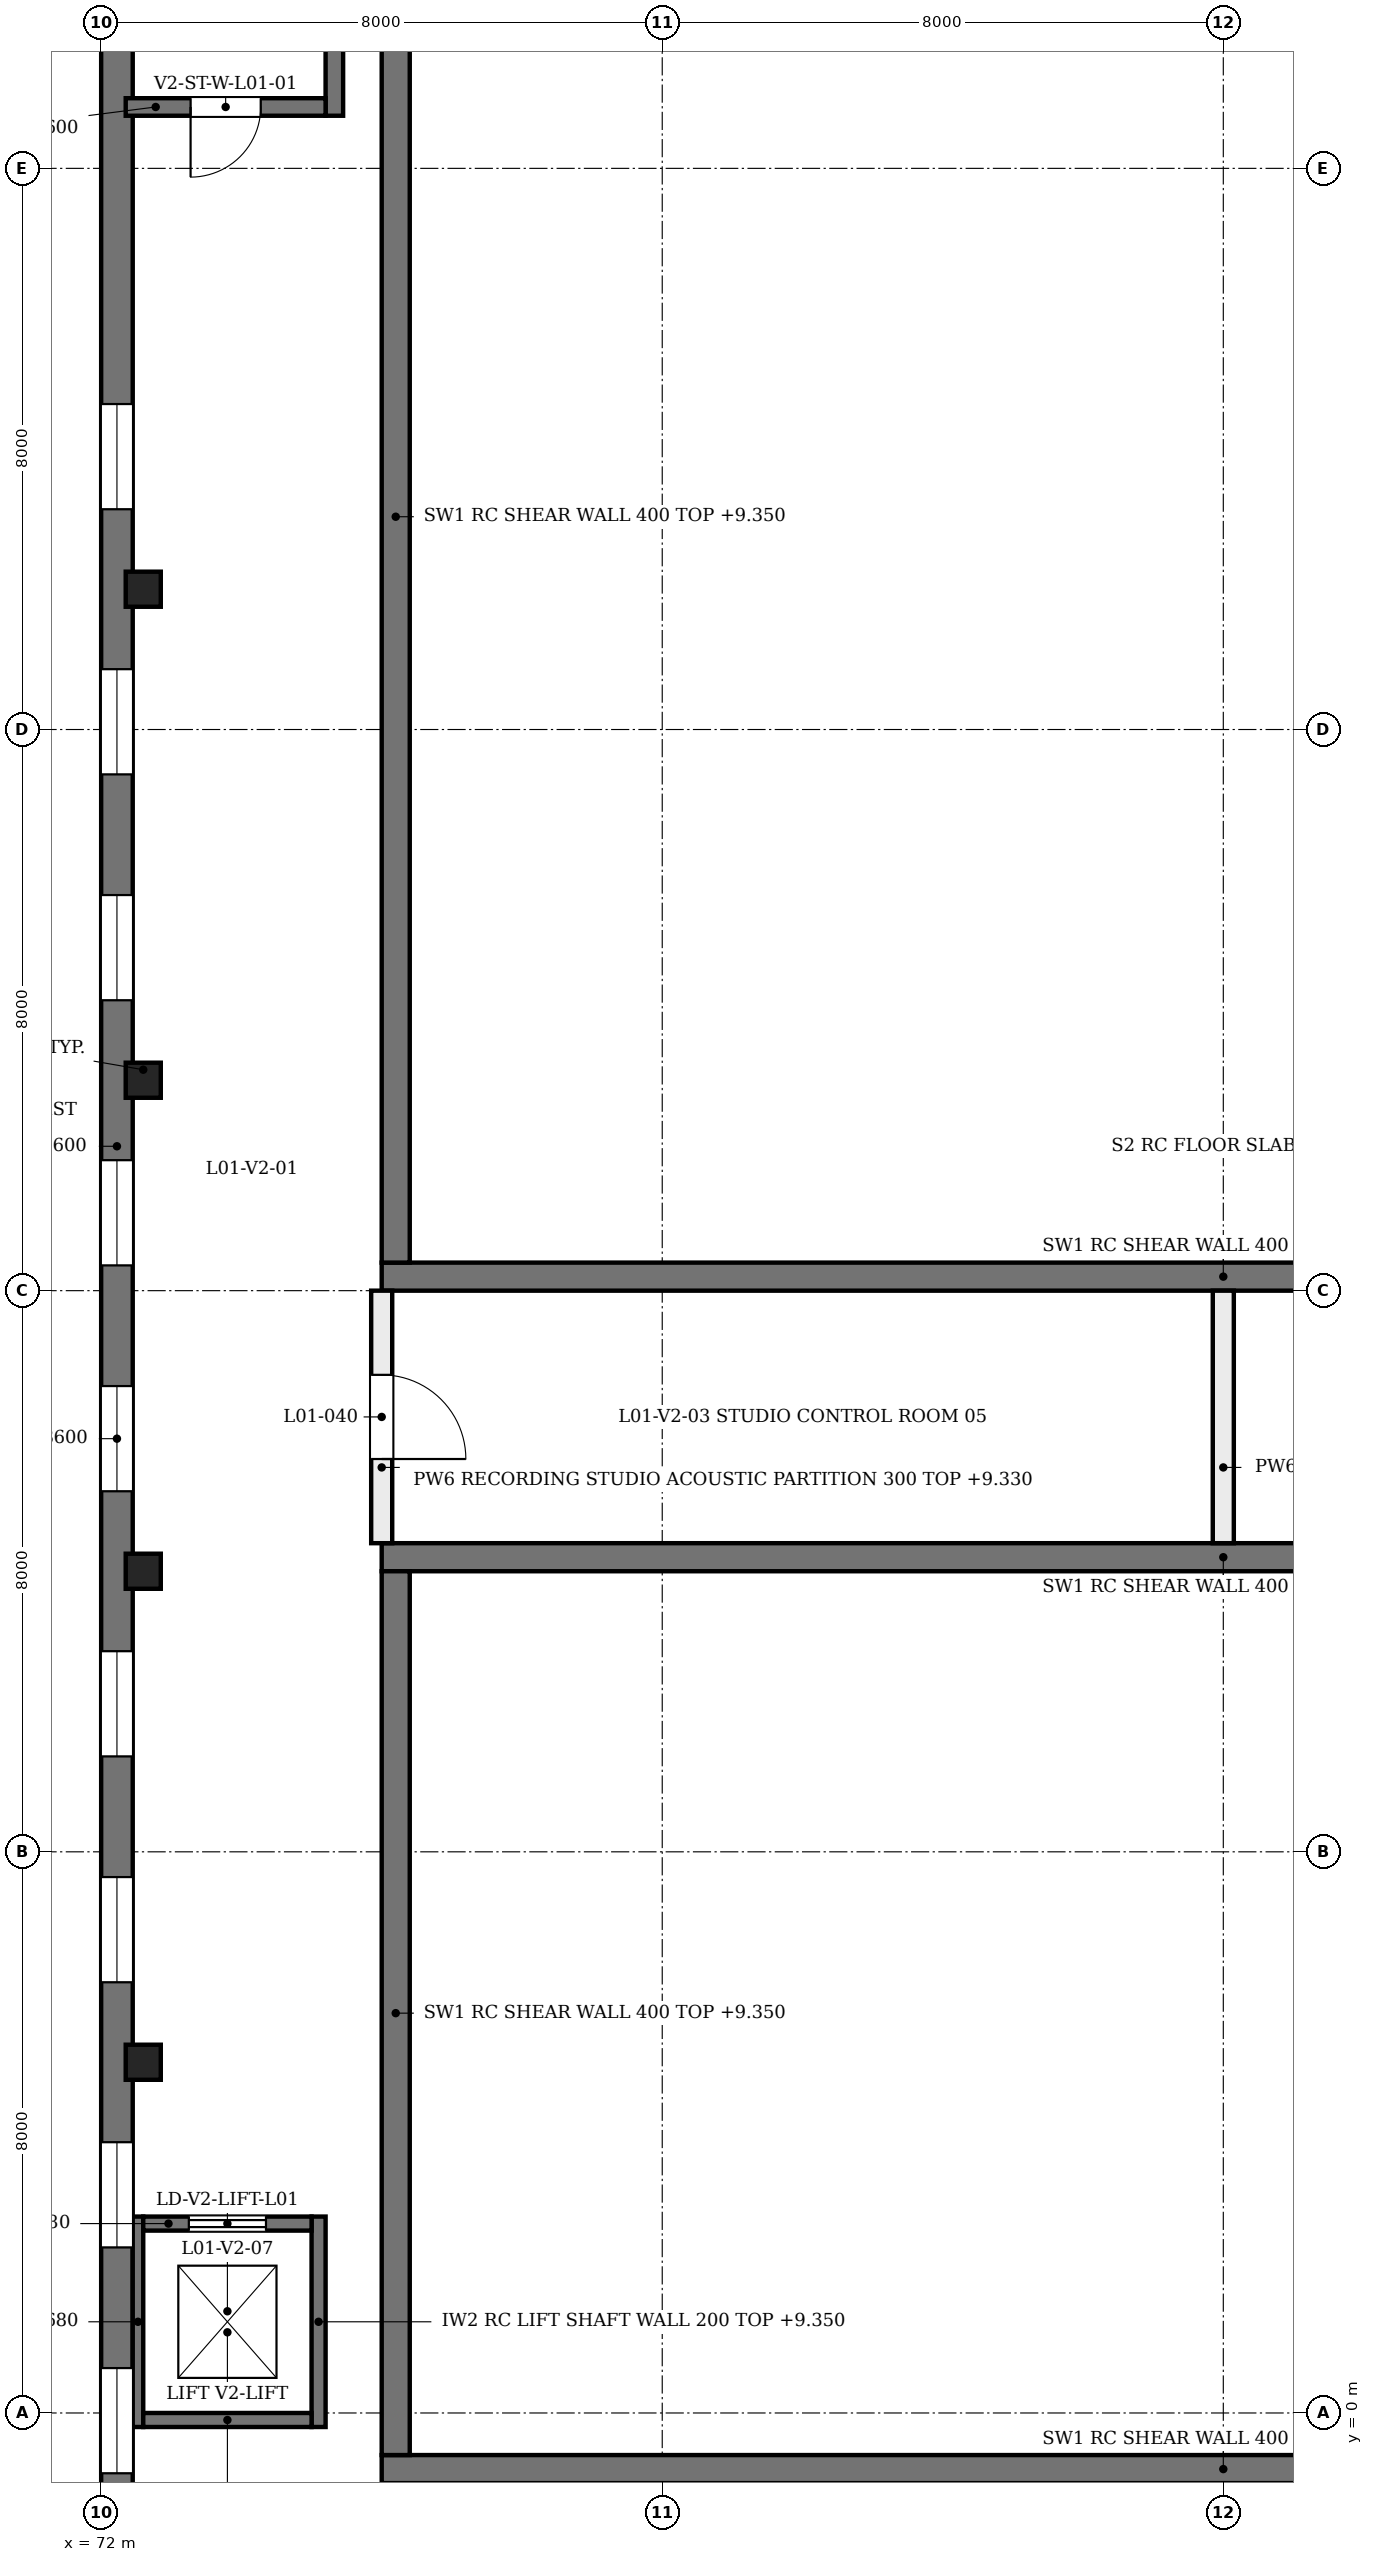
"""IFC4 building model, lengths in metres.
Left out: names, types, materials, properties, quantities, classifications, styles, units other than length and angle.
Written with IfcOpenShell. Run it as: python <this file> out.ifc"""

import sys

from ifc_helpers import new_model, si_unit, direction, frame, frame_2d, origin, origin_2d, place, context, subcontext, project, spatial, rectangle, hollow_rectangle, extrude, element, fill, save


model = new_model("IFC4")
c1 = context("Model", 3, precision=1e-05, world=origin(), true_north=direction((0.0, 1.0)))
c2 = subcontext(c1, "Body", "Model", "MODEL_VIEW")
j1 = project(units=[si_unit("LENGTHUNIT", "METRE"), si_unit("PLANEANGLEUNIT", "RADIAN")], contexts=[c1])
p1 = place(None, origin())
s1 = spatial("IfcSite", under=j1, at=p1, CompositionType="ELEMENT")
p2 = place(p1, origin())
s2 = spatial("IfcBuilding", under=s1, at=p2, CompositionType="ELEMENT")
p3 = place(p2, frame((0.0, 0.0, 4.8)))
s3 = spatial("IfcBuildingStorey", under=s2, at=p3, CompositionType="ELEMENT", Elevation=4.8)
p4 = place(p3, frame((76.0, 16.2, 0.0), z_axis=(0.0, 0.0, 1.0), x_axis=(1.0, 0.0, 0.0)))
e1 = element("IfcWall", 1, at=p4, inside=s3, PredefinedType="SHEAR", context=c2, shape_type="SweptSolid", body=[
    extrude(rectangle(XDim=24.0, YDim=0.4, at=frame_2d((12.0, 0.0))), origin(), (0.0, 0.0, 1.0), 4.55),
])
p5 = place(p3, frame((76.2, 16.4, 0.0), z_axis=(0.0, 0.0, 1.0), x_axis=(0.0, 1.0, 0.0)))
e2 = element("IfcWall", 2, at=p5, inside=s3, PredefinedType="SHEAR", context=c2, shape_type="SweptSolid", body=[
    extrude(rectangle(XDim=22.6, YDim=0.4, at=frame_2d((11.3, 0.0))), origin(), (0.0, 0.0, 1.0), 4.55),
])
for number, where, z_axis, x_axis in (
    (3, (76.0, -0.8, 0.0), (0.0, 0.0, 1.0), (1.0, 0.0, 0.0)),
    (4, (76.0, 12.2, 0.0), (0.0, 0.0, 1.0), (1.0, 0.0, 0.0)),
):
    element("IfcWall", number, at=place(p3, frame(where, z_axis=z_axis, x_axis=x_axis)), inside=s3, PredefinedType="SHEAR", context=c2, shape_type="SweptSolid", body=[
        extrude(rectangle(XDim=24.0, YDim=0.4, at=frame_2d((12.0, 0.0))), origin(), (0.0, 0.0, 1.0), 4.55),
    ])
p6 = place(p3, frame((76.2, -0.6, 0.0), z_axis=(0.0, 0.0, 1.0), x_axis=(0.0, 1.0, 0.0)))
e5 = element("IfcWall", 5, at=p6, inside=s3, PredefinedType="SHEAR", context=c2, shape_type="SweptSolid", body=[
    extrude(rectangle(XDim=12.6, YDim=0.4, at=frame_2d((6.3, 0.0))), origin(), (0.0, 0.0, 1.0), 4.55),
])
for number, where, z_axis, x_axis in (
    (6, (72.6, 5.0, 0.0), (0.0, 0.0, 1.0), (1.0, 0.0, 0.0)),
    (7, (72.6, 12.0, 0.0), (0.0, 0.0, 1.0), (1.0, 0.0, 0.0)),
    (8, (72.6, 19.0, 0.0), (0.0, 0.0, 1.0), (1.0, 0.0, 0.0)),
    (9, (72.6, 26.0, 0.0), (0.0, 0.0, 1.0), (1.0, 0.0, 0.0)),
):
    element("IfcColumn", number, at=place(p3, frame(where, z_axis=z_axis, x_axis=x_axis)), inside=s3, PredefinedType="COLUMN", context=c2, shape_type="SweptSolid", body=[
        extrude(rectangle(XDim=0.5, YDim=0.5, at=origin_2d()), origin(), (0.0, 0.0, 1.0), 4.8),
    ])
for number, where, z_axis, x_axis in (
    (10, (70.787, 5.0, 0.0), (0.101, 0.0, 0.995), (0.0, 1.0, 0.0)),
    (11, (70.787, 12.0, 0.0), (0.101, 0.0, 0.995), (0.0, 1.0, 0.0)),
    (12, (70.787, 19.0, 0.0), (0.101, 0.0, 0.995), (0.0, 1.0, 0.0)),
    (13, (70.787, 26.0, 0.0), (0.101, 0.0, 0.995), (0.0, 1.0, 0.0)),
    (14, (70.787, 33.0, 0.0), (0.101, 0.0, 0.995), (0.0, 1.0, 0.0)),
):
    element("IfcColumn", number, at=place(p3, frame(where, z_axis=z_axis, x_axis=x_axis)), inside=s3, PredefinedType="COLUMN", context=c2, shape_type="SweptSolid", body=[
        extrude(hollow_rectangle(XDim=0.4, YDim=0.4, WallThickness=0.012, InnerFilletRadius=0.012, OuterFilletRadius=0.019, at=origin_2d()), origin(), (0.0, 0.0, 1.0), 4.825),
    ])
p7 = place(p3, frame((72.225, -1.55, 0.0), z_axis=(0.0, 0.0, 1.0), x_axis=(0.0, 1.0, 0.0)))
e15 = element("IfcWall", 15, at=p7, inside=s3, PredefinedType="SOLIDWALL", context=c2, shape_type="SweptSolid", body=[
    extrude(rectangle(XDim=41.1, YDim=0.45, at=frame_2d((20.55, 0.0))), origin(), (0.0, 0.0, 1.0), 4.8),
])
p8 = place(p7, frame((0.69, 0.0, 0.6)))
e16 = element("IfcOpeningElement", 16, at=p8, cuts=e15, PredefinedType="OPENING", context=c2, shape_type="SweptSolid", body=[
    extrude(rectangle(XDim=1.5, YDim=3.6, at=frame_2d((0.75, 1.8))), frame((0.0, 0.235, 0.0), z_axis=(0.0, -1.0, 0.0), x_axis=(1.0, 0.0, 0.0)), (0.0, 0.0, 1.0), 0.47),
])
p9 = place(p7, frame((3.91, 0.0, 0.6)))
e17 = element("IfcOpeningElement", 17, at=p9, cuts=e15, PredefinedType="OPENING", context=c2, shape_type="SweptSolid", body=[
    extrude(rectangle(XDim=1.5, YDim=3.6, at=frame_2d((0.75, 1.8))), frame((0.0, 0.235, 0.0), z_axis=(0.0, -1.0, 0.0), x_axis=(1.0, 0.0, 0.0)), (0.0, 0.0, 1.0), 0.47),
])
p10 = place(p7, frame((7.69, 0.0, 0.6)))
e18 = element("IfcOpeningElement", 18, at=p10, cuts=e15, PredefinedType="OPENING", context=c2, shape_type="SweptSolid", body=[
    extrude(rectangle(XDim=1.5, YDim=3.6, at=frame_2d((0.75, 1.8))), frame((0.0, 0.235, 0.0), z_axis=(0.0, -1.0, 0.0), x_axis=(1.0, 0.0, 0.0)), (0.0, 0.0, 1.0), 0.47),
])
p11 = place(p7, frame((10.91, 0.0, 0.6)))
e19 = element("IfcOpeningElement", 19, at=p11, cuts=e15, PredefinedType="OPENING", context=c2, shape_type="SweptSolid", body=[
    extrude(rectangle(XDim=1.5, YDim=3.6, at=frame_2d((0.75, 1.8))), frame((0.0, 0.235, 0.0), z_axis=(0.0, -1.0, 0.0), x_axis=(1.0, 0.0, 0.0)), (0.0, 0.0, 1.0), 0.47),
])
p12 = place(p7, frame((14.69, 0.0, 0.6)))
e20 = element("IfcOpeningElement", 20, at=p12, cuts=e15, PredefinedType="OPENING", context=c2, shape_type="SweptSolid", body=[
    extrude(rectangle(XDim=1.5, YDim=3.6, at=frame_2d((0.75, 1.8))), frame((0.0, 0.235, 0.0), z_axis=(0.0, -1.0, 0.0), x_axis=(1.0, 0.0, 0.0)), (0.0, 0.0, 1.0), 0.47),
])
p13 = place(p7, frame((17.91, 0.0, 0.6)))
e21 = element("IfcOpeningElement", 21, at=p13, cuts=e15, PredefinedType="OPENING", context=c2, shape_type="SweptSolid", body=[
    extrude(rectangle(XDim=1.5, YDim=3.6, at=frame_2d((0.75, 1.8))), frame((0.0, 0.235, 0.0), z_axis=(0.0, -1.0, 0.0), x_axis=(1.0, 0.0, 0.0)), (0.0, 0.0, 1.0), 0.47),
])
p14 = place(p7, frame((21.69, 0.0, 0.6)))
e22 = element("IfcOpeningElement", 22, at=p14, cuts=e15, PredefinedType="OPENING", context=c2, shape_type="SweptSolid", body=[
    extrude(rectangle(XDim=1.5, YDim=3.6, at=frame_2d((0.75, 1.8))), frame((0.0, 0.235, 0.0), z_axis=(0.0, -1.0, 0.0), x_axis=(1.0, 0.0, 0.0)), (0.0, 0.0, 1.0), 0.47),
])
p15 = place(p7, frame((24.91, 0.0, 0.6)))
e23 = element("IfcOpeningElement", 23, at=p15, cuts=e15, PredefinedType="OPENING", context=c2, shape_type="SweptSolid", body=[
    extrude(rectangle(XDim=1.5, YDim=3.6, at=frame_2d((0.75, 1.8))), frame((0.0, 0.235, 0.0), z_axis=(0.0, -1.0, 0.0), x_axis=(1.0, 0.0, 0.0)), (0.0, 0.0, 1.0), 0.47),
])
p16 = place(p7, frame((28.69, 0.0, 0.6)))
e24 = element("IfcOpeningElement", 24, at=p16, cuts=e15, PredefinedType="OPENING", context=c2, shape_type="SweptSolid", body=[
    extrude(rectangle(XDim=1.5, YDim=3.6, at=frame_2d((0.75, 1.8))), frame((0.0, 0.235, 0.0), z_axis=(0.0, -1.0, 0.0), x_axis=(1.0, 0.0, 0.0)), (0.0, 0.0, 1.0), 0.47),
])
p17 = place(p3, frame((75.325, 32.75, 0.0), z_axis=(0.0, 0.0, 1.0), x_axis=(0.0, 1.0, 0.0)))
e25 = element("IfcWall", 25, at=p17, inside=s3, PredefinedType="SOLIDWALL", context=c2, shape_type="SweptSolid", body=[
    extrude(rectangle(XDim=6.8, YDim=0.25, at=frame_2d((3.4, 0.0))), origin(), (0.0, 0.0, 1.0), 4.8),
])
p18 = place(p3, frame((72.35, 32.875, 0.0), z_axis=(0.0, 0.0, 1.0), x_axis=(1.0, 0.0, 0.0)))
e26 = element("IfcWall", 26, at=p18, inside=s3, PredefinedType="SOLIDWALL", context=c2, shape_type="SweptSolid", body=[
    extrude(rectangle(XDim=2.85, YDim=0.25, at=frame_2d((1.425, 0.0))), origin(), (0.0, 0.0, 1.0), 4.8),
])
p19 = place(p18, frame((0.925, 0.0, 0.0)))
e27 = element("IfcOpeningElement", 27, at=p19, cuts=e26, PredefinedType="OPENING", context=c2, shape_type="SweptSolid", body=[
    extrude(rectangle(XDim=1.0, YDim=2.1, at=frame_2d((0.5, 1.05))), frame((0.0, 0.135, 0.0), z_axis=(0.0, -1.0, 0.0), x_axis=(1.0, 0.0, 0.0)), (0.0, 0.0, 1.0), 0.27),
])
p20 = place(p3, frame((72.525, -0.2, 0.0), z_axis=(0.0, 0.0, 1.0), x_axis=(0.0, 1.0, 0.0)))
e28 = element("IfcWall", 28, at=p20, inside=s3, PredefinedType="SOLIDWALL", context=c2, shape_type="SweptSolid", body=[
    extrude(rectangle(XDim=3.0, YDim=0.15, at=frame_2d((1.5, 0.0))), origin(), (0.0, 0.0, 1.0), 3.88),
])
p21 = place(p3, frame((75.1, -0.2, 0.0), z_axis=(0.0, 0.0, 1.0), x_axis=(0.0, 1.0, 0.0)))
e29 = element("IfcWall", 29, at=p21, inside=s3, PredefinedType="SOLIDWALL", context=c2, shape_type="SweptSolid", body=[
    extrude(rectangle(XDim=3.0, YDim=0.2, at=frame_2d((1.5, 0.0))), origin(), (0.0, 0.0, 1.0), 4.55),
])
p22 = place(p3, frame((72.6, -0.1, 0.0), z_axis=(0.0, 0.0, 1.0), x_axis=(1.0, 0.0, 0.0)))
e30 = element("IfcWall", 30, at=p22, inside=s3, PredefinedType="SOLIDWALL", context=c2, shape_type="SweptSolid", body=[
    extrude(rectangle(XDim=2.4, YDim=0.2, at=frame_2d((1.2, 0.0))), origin(), (0.0, 0.0, 1.0), 3.88),
])
p23 = place(p3, frame((72.6, 2.7, 0.0), z_axis=(0.0, 0.0, 1.0), x_axis=(1.0, 0.0, 0.0)))
e31 = element("IfcWall", 31, at=p23, inside=s3, PredefinedType="SOLIDWALL", context=c2, shape_type="SweptSolid", body=[
    extrude(rectangle(XDim=2.4, YDim=0.2, at=frame_2d((1.2, 0.0))), origin(), (0.0, 0.0, 1.0), 3.88),
])
p24 = place(p23, frame((0.65, 0.0, 0.0)))
e32 = element("IfcOpeningElement", 32, at=p24, cuts=e31, PredefinedType="OPENING", context=c2, shape_type="SweptSolid", body=[
    extrude(rectangle(XDim=1.1, YDim=2.1, at=frame_2d((0.55, 1.05))), frame((0.0, 0.11, 0.0), z_axis=(0.0, -1.0, 0.0), x_axis=(1.0, 0.0, 0.0)), (0.0, 0.0, 1.0), 0.22),
])
p25 = place(p3, frame((76.0, 12.4, 0.0), z_axis=(0.0, 0.0, 1.0), x_axis=(0.0, 1.0, 0.0)))
e33 = element("IfcWall", 33, at=p25, inside=s3, PredefinedType="PARTITIONING", context=c2, shape_type="SweptSolid", body=[
    extrude(rectangle(XDim=3.6, YDim=0.3, at=frame_2d((1.8, 0.0))), origin(), (0.0, 0.0, 1.0), 4.53),
])
p26 = place(p25, frame((1.2, 0.0, 0.0)))
e34 = element("IfcOpeningElement", 34, at=p26, cuts=e33, PredefinedType="OPENING", context=c2, shape_type="SweptSolid", body=[
    extrude(rectangle(XDim=1.2, YDim=2.2, at=frame_2d((0.6, 1.1))), frame((0.0, 0.16, 0.0), z_axis=(0.0, -1.0, 0.0), x_axis=(1.0, 0.0, 0.0)), (0.0, 0.0, 1.0), 0.32),
])
p27 = place(p3, frame((88.0, 12.4, 0.0), z_axis=(0.0, 0.0, 1.0), x_axis=(0.0, 1.0, 0.0)))
e35 = element("IfcWall", 35, at=p27, inside=s3, PredefinedType="PARTITIONING", context=c2, shape_type="SweptSolid", body=[
    extrude(rectangle(XDim=3.6, YDim=0.3, at=frame_2d((1.8, 0.0))), origin(), (0.0, 0.0, 1.0), 3.88),
])
p28 = place(p8, origin())
e36 = element("IfcWindow", 36, at=p28, inside=s3, PartitioningType="SINGLE_PANEL", PredefinedType="WINDOW", context=c2, shape_type="SweptSolid", body=[
    extrude(rectangle(XDim=1.5, YDim=3.6, at=frame_2d((0.75, 1.8))), frame((0.0, 0.03, 0.0), z_axis=(0.0, -1.0, 0.0), x_axis=(1.0, 0.0, 0.0)), (0.0, 0.0, 1.0), 0.06),
])
fill(e16, e36)
p29 = place(p9, origin())
e37 = element("IfcWindow", 37, at=p29, inside=s3, PartitioningType="SINGLE_PANEL", PredefinedType="WINDOW", context=c2, shape_type="SweptSolid", body=[
    extrude(rectangle(XDim=1.5, YDim=3.6, at=frame_2d((0.75, 1.8))), frame((0.0, 0.03, 0.0), z_axis=(0.0, -1.0, 0.0), x_axis=(1.0, 0.0, 0.0)), (0.0, 0.0, 1.0), 0.06),
])
fill(e17, e37)
p30 = place(p10, origin())
e38 = element("IfcWindow", 38, at=p30, inside=s3, PartitioningType="SINGLE_PANEL", PredefinedType="WINDOW", context=c2, shape_type="SweptSolid", body=[
    extrude(rectangle(XDim=1.5, YDim=3.6, at=frame_2d((0.75, 1.8))), frame((0.0, 0.03, 0.0), z_axis=(0.0, -1.0, 0.0), x_axis=(1.0, 0.0, 0.0)), (0.0, 0.0, 1.0), 0.06),
])
fill(e18, e38)
p31 = place(p11, origin())
e39 = element("IfcWindow", 39, at=p31, inside=s3, PartitioningType="SINGLE_PANEL", PredefinedType="WINDOW", context=c2, shape_type="SweptSolid", body=[
    extrude(rectangle(XDim=1.5, YDim=3.6, at=frame_2d((0.75, 1.8))), frame((0.0, 0.03, 0.0), z_axis=(0.0, -1.0, 0.0), x_axis=(1.0, 0.0, 0.0)), (0.0, 0.0, 1.0), 0.06),
])
fill(e19, e39)
p32 = place(p12, origin())
e40 = element("IfcWindow", 40, at=p32, inside=s3, PartitioningType="SINGLE_PANEL", PredefinedType="WINDOW", context=c2, shape_type="SweptSolid", body=[
    extrude(rectangle(XDim=1.5, YDim=3.6, at=frame_2d((0.75, 1.8))), frame((0.0, 0.03, 0.0), z_axis=(0.0, -1.0, 0.0), x_axis=(1.0, 0.0, 0.0)), (0.0, 0.0, 1.0), 0.06),
])
fill(e20, e40)
p33 = place(p13, origin())
e41 = element("IfcWindow", 41, at=p33, inside=s3, PartitioningType="SINGLE_PANEL", PredefinedType="WINDOW", context=c2, shape_type="SweptSolid", body=[
    extrude(rectangle(XDim=1.5, YDim=3.6, at=frame_2d((0.75, 1.8))), frame((0.0, 0.03, 0.0), z_axis=(0.0, -1.0, 0.0), x_axis=(1.0, 0.0, 0.0)), (0.0, 0.0, 1.0), 0.06),
])
fill(e21, e41)
p34 = place(p14, origin())
e42 = element("IfcWindow", 42, at=p34, inside=s3, PartitioningType="SINGLE_PANEL", PredefinedType="WINDOW", context=c2, shape_type="SweptSolid", body=[
    extrude(rectangle(XDim=1.5, YDim=3.6, at=frame_2d((0.75, 1.8))), frame((0.0, 0.03, 0.0), z_axis=(0.0, -1.0, 0.0), x_axis=(1.0, 0.0, 0.0)), (0.0, 0.0, 1.0), 0.06),
])
fill(e22, e42)
p35 = place(p15, origin())
e43 = element("IfcWindow", 43, at=p35, inside=s3, PartitioningType="SINGLE_PANEL", PredefinedType="WINDOW", context=c2, shape_type="SweptSolid", body=[
    extrude(rectangle(XDim=1.5, YDim=3.6, at=frame_2d((0.75, 1.8))), frame((0.0, 0.03, 0.0), z_axis=(0.0, -1.0, 0.0), x_axis=(1.0, 0.0, 0.0)), (0.0, 0.0, 1.0), 0.06),
])
fill(e23, e43)
p36 = place(p16, origin())
e44 = element("IfcWindow", 44, at=p36, inside=s3, PartitioningType="SINGLE_PANEL", PredefinedType="WINDOW", context=c2, shape_type="SweptSolid", body=[
    extrude(rectangle(XDim=1.5, YDim=3.6, at=frame_2d((0.75, 1.8))), frame((0.0, 0.03, 0.0), z_axis=(0.0, -1.0, 0.0), x_axis=(1.0, 0.0, 0.0)), (0.0, 0.0, 1.0), 0.06),
])
fill(e24, e44)
p37 = place(p19, frame((1.0, 0.0, 0.0), z_axis=(0.0, 0.0, 1.0), x_axis=(-1.0, 0.0, 0.0)))
e45 = element("IfcDoor", 45, at=p37, inside=s3, OperationType="SINGLE_SWING_LEFT", PredefinedType="DOOR", context=c2, shape_type="SweptSolid", body=[
    extrude(rectangle(XDim=1.0, YDim=2.1, at=frame_2d((0.5, 1.05))), frame((0.0, 0.025, 0.0), z_axis=(0.0, -1.0, 0.0), x_axis=(1.0, 0.0, 0.0)), (0.0, 0.0, 1.0), 0.05),
])
fill(e27, e45)
p38 = place(p24, origin())
e46 = element("IfcDoor", 46, at=p38, inside=s3, OperationType="DOUBLE_DOOR_SLIDING", PredefinedType="DOOR", context=c2, shape_type="SweptSolid", body=[
    extrude(rectangle(XDim=1.1, YDim=2.1, at=frame_2d((0.55, 1.05))), frame((0.0, 0.025, 0.0), z_axis=(0.0, -1.0, 0.0), x_axis=(1.0, 0.0, 0.0)), (0.0, 0.0, 1.0), 0.05),
])
fill(e32, e46)
p39 = place(p26, frame((1.2, 0.0, 0.0), z_axis=(0.0, 0.0, 1.0), x_axis=(-1.0, 0.0, 0.0)))
e47 = element("IfcDoor", 47, at=p39, inside=s3, OperationType="SINGLE_SWING_LEFT", PredefinedType="DOOR", context=c2, shape_type="SweptSolid", body=[
    extrude(rectangle(XDim=1.2, YDim=2.2, at=frame_2d((0.6, 1.1))), frame((0.0, 0.025, 0.0), z_axis=(0.0, -1.0, 0.0), x_axis=(1.0, 0.0, 0.0)), (0.0, 0.0, 1.0), 0.05),
])
fill(e34, e47)
save(model, sys.argv[1])
